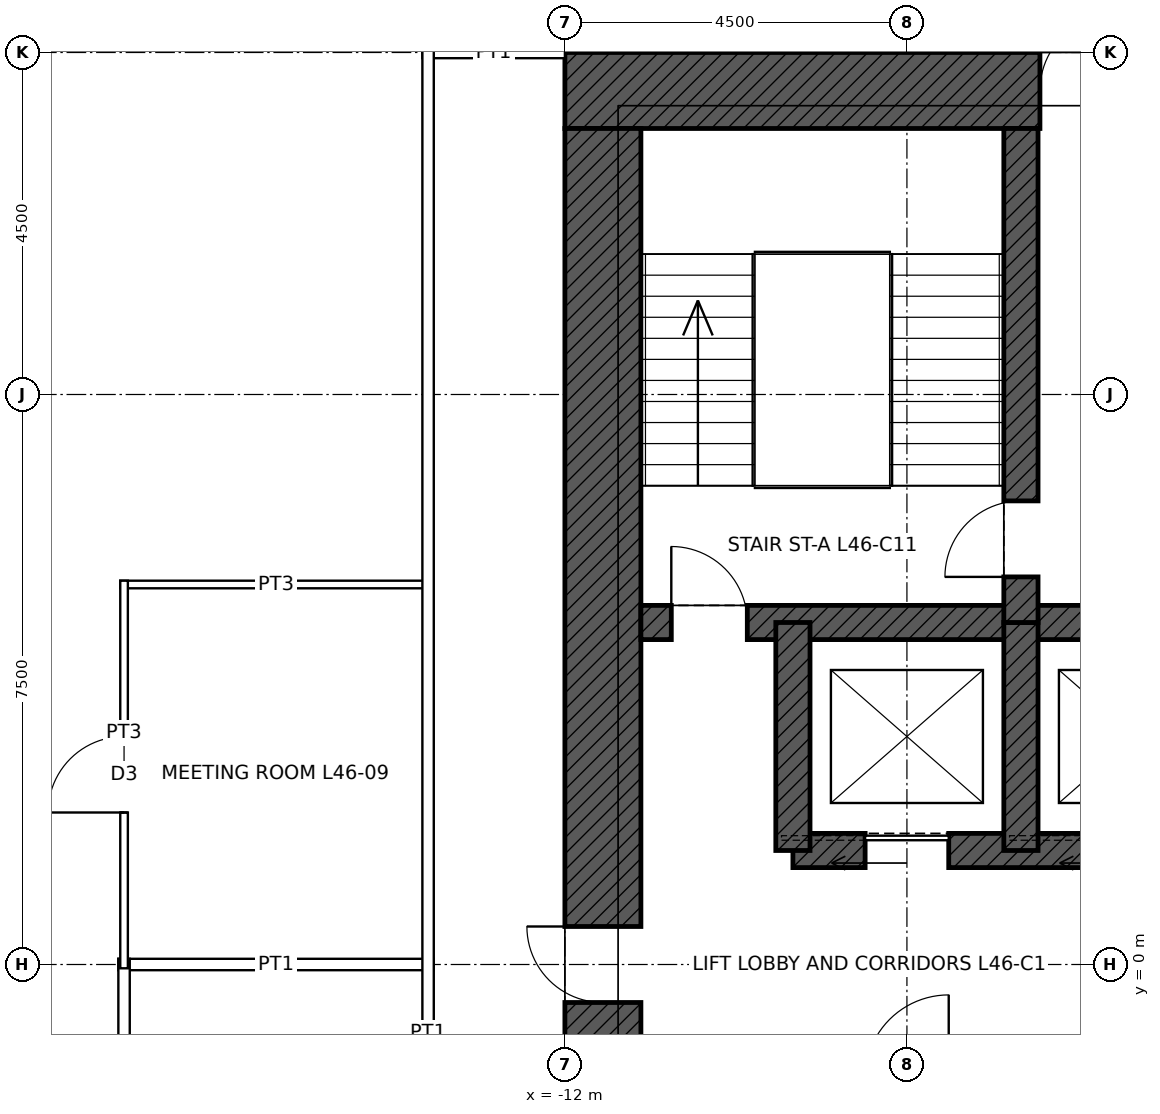
"""IFC4 building model, lengths in metres.
Left out: names, types, materials, properties, quantities, classifications, styles, units other than length and angle.
Written with IfcOpenShell. Run it as: python <this file> out.ifc"""

import sys

from ifc_helpers import new_model, si_unit, direction, frame, frame_2d, origin, place, context, subcontext, project, spatial, rectangle, extrude, element, fill, save


model = new_model("IFC4")
c1 = context("Model", 3, precision=1e-05, world=origin(), true_north=direction((0.0, 1.0)))
c2 = subcontext(c1, "Body", "Model", "MODEL_VIEW")
j1 = project(units=[si_unit("LENGTHUNIT", "METRE"), si_unit("PLANEANGLEUNIT", "RADIAN")], contexts=[c1])
p1 = place(None, origin())
s1 = spatial("IfcSite", under=j1, at=p1, CompositionType="ELEMENT")
p2 = place(p1, origin())
s2 = spatial("IfcBuilding", under=s1, at=p2, CompositionType="ELEMENT")
p3 = place(p2, frame((0.0, 0.0, 217.9)))
s3 = spatial("IfcBuildingStorey", under=s2, at=p3, CompositionType="ELEMENT", Elevation=217.9)
p4 = place(p3, frame((-12.0, 11.5, 0.0), z_axis=(0.0, 0.0, 1.0), x_axis=(1.0, 0.0, 0.0)))
e1 = element("IfcWall", 1, at=p4, inside=s3, PredefinedType="SHEAR", context=c2, shape_type="SweptSolid", body=[
    extrude(rectangle(XDim=24.0, YDim=1.0, at=frame_2d((12.0, 0.0))), origin(), (0.0, 0.0, 1.0), 4.0),
])
p5 = place(p4, frame((6.25, 0.0, 0.0)))
e2 = element("IfcOpeningElement", 2, at=p5, cuts=e1, PredefinedType="OPENING", context=c2, shape_type="SweptSolid", body=[
    extrude(rectangle(XDim=1.0, YDim=2.4, at=frame_2d((0.5, 1.2))), frame((0.0, 0.51, 0.0), z_axis=(0.0, -1.0, 0.0), x_axis=(1.0, 0.0, 0.0)), (0.0, 0.0, 1.0), 1.02),
])
p6 = place(p4, frame((16.75, 0.0, 0.0)))
e3 = element("IfcOpeningElement", 3, at=p6, cuts=e1, PredefinedType="OPENING", context=c2, shape_type="SweptSolid", body=[
    extrude(rectangle(XDim=1.0, YDim=2.4, at=frame_2d((0.5, 1.2))), frame((0.0, 0.51, 0.0), z_axis=(0.0, -1.0, 0.0), x_axis=(1.0, 0.0, 0.0)), (0.0, 0.0, 1.0), 1.02),
])
p7 = place(p3, frame((-11.5, -11.0, 0.0), z_axis=(0.0, 0.0, 1.0), x_axis=(0.0, 1.0, 0.0)))
e4 = element("IfcWall", 4, at=p7, inside=s3, PredefinedType="SHEAR", context=c2, shape_type="SweptSolid", body=[
    extrude(rectangle(XDim=22.0, YDim=1.0, at=frame_2d((11.0, 0.0))), origin(), (0.0, 0.0, 1.0), 4.0),
])
p8 = place(p7, frame((10.5, 0.0, 0.0)))
e5 = element("IfcOpeningElement", 5, at=p8, cuts=e4, PredefinedType="OPENING", context=c2, shape_type="SweptSolid", body=[
    extrude(rectangle(XDim=1.0, YDim=2.4, at=frame_2d((0.5, 1.2))), frame((0.0, 0.51, 0.0), z_axis=(0.0, -1.0, 0.0), x_axis=(1.0, 0.0, 0.0)), (0.0, 0.0, 1.0), 1.02),
])
p9 = place(p3, frame((-11.0, 4.5, 0.0), z_axis=(0.0, 0.0, 1.0), x_axis=(1.0, 0.0, 0.0)))
e6 = element("IfcWall", 6, at=p9, inside=s3, PredefinedType="SHEAR", context=c2, shape_type="SweptSolid", body=[
    extrude(rectangle(XDim=22.0, YDim=0.45, at=frame_2d((11.0, 0.0))), origin(), (0.0, 0.0, 1.0), 4.0),
])
p10 = place(p9, frame((0.4, 0.0, 0.0)))
e7 = element("IfcOpeningElement", 7, at=p10, cuts=e6, PredefinedType="OPENING", context=c2, shape_type="SweptSolid", body=[
    extrude(rectangle(XDim=1.0, YDim=2.1, at=frame_2d((0.5, 1.05))), frame((0.0, 0.235, 0.0), z_axis=(0.0, -1.0, 0.0), x_axis=(1.0, 0.0, 0.0)), (0.0, 0.0, 1.0), 0.47),
])
p11 = place(p9, frame((20.6, 0.0, 0.0)))
e8 = element("IfcOpeningElement", 8, at=p11, cuts=e6, PredefinedType="OPENING", context=c2, shape_type="SweptSolid", body=[
    extrude(rectangle(XDim=1.0, YDim=2.1, at=frame_2d((0.5, 1.05))), frame((0.0, 0.235, 0.0), z_axis=(0.0, -1.0, 0.0), x_axis=(1.0, 0.0, 0.0)), (0.0, 0.0, 1.0), 0.47),
])
p12 = place(p3, frame((-9.0, 1.5, 0.0), z_axis=(0.0, 0.0, 1.0), x_axis=(1.0, 0.0, 0.0)))
e9 = element("IfcWall", 9, at=p12, inside=s3, PredefinedType="SHEAR", context=c2, shape_type="SweptSolid", body=[
    extrude(rectangle(XDim=18.0, YDim=0.45, at=frame_2d((9.0, 0.0))), origin(), (0.0, 0.0, 1.0), 4.0),
])
p13 = place(p12, frame((0.95, 0.0, 0.0)))
e10 = element("IfcOpeningElement", 10, at=p13, cuts=e9, PredefinedType="OPENING", context=c2, shape_type="SweptSolid", body=[
    extrude(rectangle(XDim=1.1, YDim=2.1, at=frame_2d((0.55, 1.05))), frame((0.0, 0.235, 0.0), z_axis=(0.0, -1.0, 0.0), x_axis=(1.0, 0.0, 0.0)), (0.0, 0.0, 1.0), 0.47),
])
p14 = place(p12, frame((3.95, 0.0, 0.0)))
e11 = element("IfcOpeningElement", 11, at=p14, cuts=e9, PredefinedType="OPENING", context=c2, shape_type="SweptSolid", body=[
    extrude(rectangle(XDim=1.1, YDim=2.1, at=frame_2d((0.55, 1.05))), frame((0.0, 0.235, 0.0), z_axis=(0.0, -1.0, 0.0), x_axis=(1.0, 0.0, 0.0)), (0.0, 0.0, 1.0), 0.47),
])
p15 = place(p12, frame((6.95, 0.0, 0.0)))
e12 = element("IfcOpeningElement", 12, at=p15, cuts=e9, PredefinedType="OPENING", context=c2, shape_type="SweptSolid", body=[
    extrude(rectangle(XDim=1.1, YDim=2.1, at=frame_2d((0.55, 1.05))), frame((0.0, 0.235, 0.0), z_axis=(0.0, -1.0, 0.0), x_axis=(1.0, 0.0, 0.0)), (0.0, 0.0, 1.0), 0.47),
])
p16 = place(p12, frame((9.95, 0.0, 0.0)))
e13 = element("IfcOpeningElement", 13, at=p16, cuts=e9, PredefinedType="OPENING", context=c2, shape_type="SweptSolid", body=[
    extrude(rectangle(XDim=1.1, YDim=2.1, at=frame_2d((0.55, 1.05))), frame((0.0, 0.235, 0.0), z_axis=(0.0, -1.0, 0.0), x_axis=(1.0, 0.0, 0.0)), (0.0, 0.0, 1.0), 0.47),
])
p17 = place(p12, frame((12.95, 0.0, 0.0)))
e14 = element("IfcOpeningElement", 14, at=p17, cuts=e9, PredefinedType="OPENING", context=c2, shape_type="SweptSolid", body=[
    extrude(rectangle(XDim=1.1, YDim=2.1, at=frame_2d((0.55, 1.05))), frame((0.0, 0.235, 0.0), z_axis=(0.0, -1.0, 0.0), x_axis=(1.0, 0.0, 0.0)), (0.0, 0.0, 1.0), 0.47),
])
p18 = place(p12, frame((15.95, 0.0, 0.0)))
e15 = element("IfcOpeningElement", 15, at=p18, cuts=e9, PredefinedType="OPENING", context=c2, shape_type="SweptSolid", body=[
    extrude(rectangle(XDim=1.1, YDim=2.1, at=frame_2d((0.55, 1.05))), frame((0.0, 0.235, 0.0), z_axis=(0.0, -1.0, 0.0), x_axis=(1.0, 0.0, 0.0)), (0.0, 0.0, 1.0), 0.47),
])
for number, where, z_axis, x_axis in (
    (16, (-9.0, 1.5, 0.0), (0.0, 0.0, 1.0), (0.0, 1.0, 0.0)),
    (17, (-6.0, 1.5, 0.0), (0.0, 0.0, 1.0), (0.0, 1.0, 0.0)),
):
    element("IfcWall", number, at=place(p3, frame(where, z_axis=z_axis, x_axis=x_axis)), inside=s3, PredefinedType="SHEAR", context=c2, shape_type="SweptSolid", body=[
        extrude(rectangle(XDim=3.0, YDim=0.45, at=frame_2d((1.5, 0.0))), origin(), (0.0, 0.0, 1.0), 4.0),
    ])
p19 = place(p3, frame((-6.0, 4.5, 0.0), z_axis=(0.0, 0.0, 1.0), x_axis=(0.0, 1.0, 0.0)))
e18 = element("IfcWall", 18, at=p19, inside=s3, PredefinedType="SHEAR", context=c2, shape_type="SweptSolid", body=[
    extrude(rectangle(XDim=6.5, YDim=0.45, at=frame_2d((3.25, 0.0))), origin(), (0.0, 0.0, 1.0), 4.0),
])
p20 = place(p19, frame((0.6, 0.0, 0.0)))
e19 = element("IfcOpeningElement", 19, at=p20, cuts=e18, PredefinedType="OPENING", context=c2, shape_type="SweptSolid", body=[
    extrude(rectangle(XDim=1.0, YDim=2.1, at=frame_2d((0.5, 1.05))), frame((0.0, 0.235, 0.0), z_axis=(0.0, -1.0, 0.0), x_axis=(1.0, 0.0, 0.0)), (0.0, 0.0, 1.0), 0.47),
])
p21 = place(p3, frame((-17.875, 0.0, 0.0), z_axis=(0.0, 0.0, 1.0), x_axis=(1.0, 0.0, 0.0)))
e20 = element("IfcWall", 20, at=p21, inside=s3, PredefinedType="PARTITIONING", context=c2, shape_type="SweptSolid", body=[
    extrude(rectangle(XDim=4.15, YDim=0.15, at=frame_2d((2.075, 0.0))), origin(), (0.0, 0.0, 1.0), 3.238),
])
p22 = place(p3, frame((-17.85, 5.0, 0.0), z_axis=(0.0, 0.0, 1.0), x_axis=(1.0, 0.0, 0.0)))
e21 = element("IfcWall", 21, at=p22, inside=s3, PredefinedType="PARTITIONING", context=c2, shape_type="SweptSolid", body=[
    extrude(rectangle(XDim=4.1, YDim=0.1, at=frame_2d((2.05, 0.0))), origin(), (0.0, 0.0, 1.0), 3.85),
])
p23 = place(p3, frame((-13.875, 12.0, 0.0), z_axis=(0.0, 0.0, 1.0), x_axis=(1.0, 0.0, 0.0)))
e22 = element("IfcWall", 22, at=p23, inside=s3, PredefinedType="PARTITIONING", context=c2, shape_type="SweptSolid", body=[
    extrude(rectangle(XDim=1.875, YDim=0.15, at=frame_2d((0.938, 0.0))), origin(), (0.0, 0.0, 1.0), 3.85),
])
p24 = place(p3, frame((-17.8, -5.075, 0.0), z_axis=(0.0, 0.0, 1.0), x_axis=(0.0, 1.0, 0.0)))
e23 = element("IfcWall", 23, at=p24, inside=s3, PredefinedType="PARTITIONING", context=c2, shape_type="SweptSolid", body=[
    extrude(rectangle(XDim=5.15, YDim=0.15, at=frame_2d((2.575, 0.0))), origin(), (0.0, 0.0, 1.0), 3.85),
])
p25 = place(p24, frame((2.075, 0.0, 0.0)))
e24 = element("IfcOpeningElement", 24, at=p25, cuts=e23, PredefinedType="OPENING", context=c2, shape_type="SweptSolid", body=[
    extrude(rectangle(XDim=1.0, YDim=2.1, at=frame_2d((0.5, 1.05))), frame((0.0, 0.085, 0.0), z_axis=(0.0, -1.0, 0.0), x_axis=(1.0, 0.0, 0.0)), (0.0, 0.0, 1.0), 0.17),
])
p26 = place(p3, frame((-17.8, -0.05, 0.0), z_axis=(0.0, 0.0, 1.0), x_axis=(0.0, 1.0, 0.0)))
e25 = element("IfcWall", 25, at=p26, inside=s3, PredefinedType="PARTITIONING", context=c2, shape_type="SweptSolid", body=[
    extrude(rectangle(XDim=5.1, YDim=0.1, at=frame_2d((2.55, 0.0))), origin(), (0.0, 0.0, 1.0), 3.85),
])
p27 = place(p26, frame((2.05, 0.0, 0.0)))
e26 = element("IfcOpeningElement", 26, at=p27, cuts=e25, PredefinedType="OPENING", context=c2, shape_type="SweptSolid", body=[
    extrude(rectangle(XDim=1.0, YDim=2.1, at=frame_2d((0.5, 1.05))), frame((0.0, 0.06, 0.0), z_axis=(0.0, -1.0, 0.0), x_axis=(1.0, 0.0, 0.0)), (0.0, 0.0, 1.0), 0.12),
])
p28 = place(p3, frame((-13.8, -13.875, 0.0), z_axis=(0.0, 0.0, 1.0), x_axis=(0.0, 1.0, 0.0)))
e27 = element("IfcWall", 27, at=p28, inside=s3, PredefinedType="PARTITIONING", context=c2, shape_type="SweptSolid", body=[
    extrude(rectangle(XDim=25.95, YDim=0.15, at=frame_2d((12.975, 0.0))), origin(), (0.0, 0.0, 1.0), 3.85),
])
p29 = place(p10, origin())
e28 = element("IfcDoor", 28, at=p29, inside=s3, OperationType="SINGLE_SWING_LEFT", PredefinedType="DOOR", context=c2, shape_type="SweptSolid", body=[
    extrude(rectangle(XDim=1.0, YDim=2.1, at=frame_2d((0.5, 1.05))), frame((0.0, 0.025, 0.0), z_axis=(0.0, -1.0, 0.0), x_axis=(1.0, 0.0, 0.0)), (0.0, 0.0, 1.0), 0.05),
])
fill(e7, e28)
p30 = place(p20, origin())
e29 = element("IfcDoor", 29, at=p30, inside=s3, OperationType="SINGLE_SWING_LEFT", PredefinedType="DOOR", context=c2, shape_type="SweptSolid", body=[
    extrude(rectangle(XDim=1.0, YDim=2.1, at=frame_2d((0.5, 1.05))), frame((0.0, 0.025, 0.0), z_axis=(0.0, -1.0, 0.0), x_axis=(1.0, 0.0, 0.0)), (0.0, 0.0, 1.0), 0.05),
])
fill(e19, e29)
p31 = place(p5, origin())
e30 = element("IfcDoor", 30, at=p31, inside=s3, OperationType="SINGLE_SWING_RIGHT", PredefinedType="DOOR", context=c2, shape_type="SweptSolid", body=[
    extrude(rectangle(XDim=1.0, YDim=2.4, at=frame_2d((0.5, 1.2))), frame((0.0, 0.485, 0.0), z_axis=(0.0, -1.0, 0.0), x_axis=(1.0, 0.0, 0.0)), (0.0, 0.0, 1.0), 0.05),
])
fill(e2, e30)
p32 = place(p8, origin())
e31 = element("IfcDoor", 31, at=p32, inside=s3, OperationType="SINGLE_SWING_RIGHT", PredefinedType="DOOR", context=c2, shape_type="SweptSolid", body=[
    extrude(rectangle(XDim=1.0, YDim=2.4, at=frame_2d((0.5, 1.2))), frame((0.0, 0.485, 0.0), z_axis=(0.0, -1.0, 0.0), x_axis=(1.0, 0.0, 0.0)), (0.0, 0.0, 1.0), 0.05),
])
fill(e5, e31)
p33 = place(p13, origin())
e32 = element("IfcDoor", 32, at=p33, inside=s3, OperationType="SLIDING_TO_LEFT", PredefinedType="DOOR", context=c2, shape_type="SweptSolid", body=[
    extrude(rectangle(XDim=1.1, YDim=2.1, at=frame_2d((0.55, 1.05))), frame((0.0, 0.025, 0.0), z_axis=(0.0, -1.0, 0.0), x_axis=(1.0, 0.0, 0.0)), (0.0, 0.0, 1.0), 0.05),
])
fill(e10, e32)
p34 = place(p27, origin())
e33 = element("IfcDoor", 33, at=p34, inside=s3, OperationType="SINGLE_SWING_LEFT", PredefinedType="DOOR", context=c2, shape_type="SweptSolid", body=[
    extrude(rectangle(XDim=1.0, YDim=2.1, at=frame_2d((0.5, 1.05))), frame((0.0, 0.025, 0.0), z_axis=(0.0, -1.0, 0.0), x_axis=(1.0, 0.0, 0.0)), (0.0, 0.0, 1.0), 0.05),
])
fill(e26, e33)
save(model, sys.argv[1])
